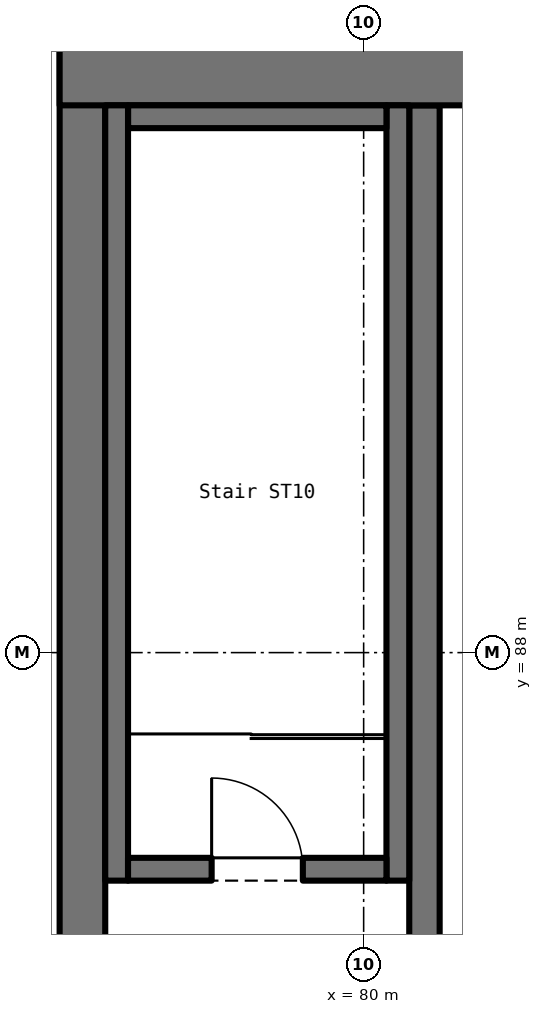
"""IFC4 building model, lengths in metres.
Left out: names, types, materials, properties, quantities, classifications, styles, units other than length and angle.
Written with IfcOpenShell. Run it as: python <this file> out.ifc"""

import sys

from ifc_helpers import new_model, si_unit, direction, frame, frame_2d, origin, place, context, subcontext, project, spatial, polyline, rectangle, outline, extrude, element, fill, save


model = new_model("IFC4")
c1 = context("Model", 3, precision=1e-05, world=origin(), true_north=direction((0.0, 1.0)))
c2 = subcontext(c1, "Body", "Model", "MODEL_VIEW")
j1 = project(units=[si_unit("LENGTHUNIT", "METRE"), si_unit("PLANEANGLEUNIT", "RADIAN")], contexts=[c1])
p1 = place(None, origin())
s1 = spatial("IfcSite", under=j1, at=p1, CompositionType="ELEMENT")
p2 = place(p1, origin())
s2 = spatial("IfcBuilding", under=s1, at=p2, CompositionType="ELEMENT")
p3 = place(p2, frame((0.0, 0.0, 22.5)))
s3 = spatial("IfcBuildingStorey", under=s2, at=p3, CompositionType="ELEMENT", Elevation=22.5)
p4 = place(p3, frame((76.3, 64.0, 0.0), z_axis=(0.0, 0.0, 1.0), x_axis=(0.0, 1.0, 0.0)))
e1 = element("IfcWall", 1, at=p4, inside=s3, PredefinedType="SHEAR", context=c2, shape_type="SweptSolid", body=[
    extrude(rectangle(XDim=32.0, YDim=0.6, at=frame_2d((16.0, 0.0))), origin(), (0.0, 0.0, 1.0), 3.0),
])
p5 = place(p4, frame((16.275, 0.0, 1.0)))
e2 = element("IfcOpeningElement", 2, at=p5, cuts=e1, PredefinedType="OPENING", context=c2, shape_type="SweptSolid", body=[
    extrude(rectangle(XDim=0.45, YDim=1.8, at=frame_2d((0.225, 0.9))), frame((0.0, 0.312, 0.0), z_axis=(0.0, -1.0, 0.0), x_axis=(1.0, 0.0, 0.0)), (0.0, 0.0, 1.0), 0.624),
])
p6 = place(p4, frame((19.275, 0.0, 1.0)))
e3 = element("IfcOpeningElement", 3, at=p6, cuts=e1, PredefinedType="OPENING", context=c2, shape_type="SweptSolid", body=[
    extrude(rectangle(XDim=0.45, YDim=1.8, at=frame_2d((0.225, 0.9))), frame((0.0, 0.312, 0.0), z_axis=(0.0, -1.0, 0.0), x_axis=(1.0, 0.0, 0.0)), (0.0, 0.0, 1.0), 0.624),
])
p7 = place(p3, frame((80.8, 95.2, 0.0), z_axis=(0.0, 0.0, 1.0), x_axis=(0.0, -1.0, 0.0)))
e4 = element("IfcWall", 4, at=p7, inside=s3, PredefinedType="SHEAR", context=c2, shape_type="SweptSolid", body=[
    extrude(rectangle(XDim=11.213, YDim=0.4, at=frame_2d((5.606, 0.0))), origin(), (0.0, 0.0, 1.0), 3.0),
])
p8 = place(p3, frame((76.0, 95.6, 0.0), z_axis=(0.0, 0.0, 1.0), x_axis=(1.0, 0.0, 0.0)))
e5 = element("IfcWall", 5, at=p8, inside=s3, PredefinedType="SHEAR", context=c2, shape_type="SweptSolid", body=[
    extrude(outline(polyline([(0.0, 0.0), (40.0, 0.0), (40.0, 3.0), (38.08, 3.0), (35.46, 5.5), (35.42, 5.5), (32.8, 5.5), (32.799, 5.5), (29.087, 5.5), (28.0, 5.5), (25.826, 5.5), (22.006, 5.5), (17.994, 5.5), (14.174, 5.5), (12.0, 5.5), (10.913, 5.5), (7.201, 5.5), (7.2, 5.5), (4.58, 5.5), (4.54, 5.5), (1.92, 3.0), (0.0, 3.0), (0.0, 0.0)])), frame((0.0, 0.4, 0.0), z_axis=(0.0, -1.0, 0.0), x_axis=(1.0, 0.0, 0.0)), (0.0, 0.0, 1.0), 0.8),
])
p9 = place(p3, frame((80.45, 85.0, 0.0), z_axis=(0.0, 0.0, 1.0), x_axis=(0.0, 1.0, 0.0)))
e6 = element("IfcWall", 6, at=p9, inside=s3, PredefinedType="SOLIDWALL", context=c2, shape_type="SweptSolid", body=[
    extrude(rectangle(XDim=10.2, YDim=0.3, at=frame_2d((5.1, 0.0))), origin(), (0.0, 0.0, 1.0), 2.9),
])
p10 = place(p3, frame((80.3, 95.05, 0.0), z_axis=(0.0, 0.0, 1.0), x_axis=(-1.0, 0.0, 0.0)))
e7 = element("IfcWall", 7, at=p10, inside=s3, PredefinedType="SOLIDWALL", context=c2, shape_type="SweptSolid", body=[
    extrude(rectangle(XDim=3.4, YDim=0.3, at=frame_2d((1.7, 0.0))), origin(), (0.0, 0.0, 1.0), 2.9),
])
p11 = place(p3, frame((76.75, 95.2, 0.0), z_axis=(0.0, 0.0, 1.0), x_axis=(0.0, -1.0, 0.0)))
e8 = element("IfcWall", 8, at=p11, inside=s3, PredefinedType="SOLIDWALL", context=c2, shape_type="SweptSolid", body=[
    extrude(rectangle(XDim=10.2, YDim=0.3, at=frame_2d((5.1, 0.0))), origin(), (0.0, 0.0, 1.0), 2.9),
])
p12 = place(p3, frame((76.9, 85.15, 0.0), z_axis=(0.0, 0.0, 1.0), x_axis=(1.0, 0.0, 0.0)))
e9 = element("IfcWall", 9, at=p12, inside=s3, PredefinedType="SOLIDWALL", context=c2, shape_type="SweptSolid", body=[
    extrude(rectangle(XDim=3.4, YDim=0.3, at=frame_2d((1.7, 0.0))), origin(), (0.0, 0.0, 1.0), 2.9),
])
p13 = place(p12, frame((1.1, 0.0, 0.0)))
e10 = element("IfcOpeningElement", 10, at=p13, cuts=e9, PredefinedType="OPENING", context=c2, shape_type="SweptSolid", body=[
    extrude(rectangle(XDim=1.2, YDim=2.1, at=frame_2d((0.6, 1.05))), frame((0.0, 0.162, 0.0), z_axis=(0.0, -1.0, 0.0), x_axis=(1.0, 0.0, 0.0)), (0.0, 0.0, 1.0), 0.324),
])
p14 = place(p13, origin())
e11 = element("IfcDoor", 11, at=p14, inside=s3, OperationType="SINGLE_SWING_LEFT", PredefinedType="DOOR", context=c2, shape_type="SweptSolid", body=[
    extrude(rectangle(XDim=1.2, YDim=2.1, at=frame_2d((0.6, 1.05))), frame((0.0, 0.025, 0.0), z_axis=(0.0, -1.0, 0.0), x_axis=(1.0, 0.0, 0.0)), (0.0, 0.0, 1.0), 0.05),
])
fill(e10, e11)
save(model, sys.argv[1])
